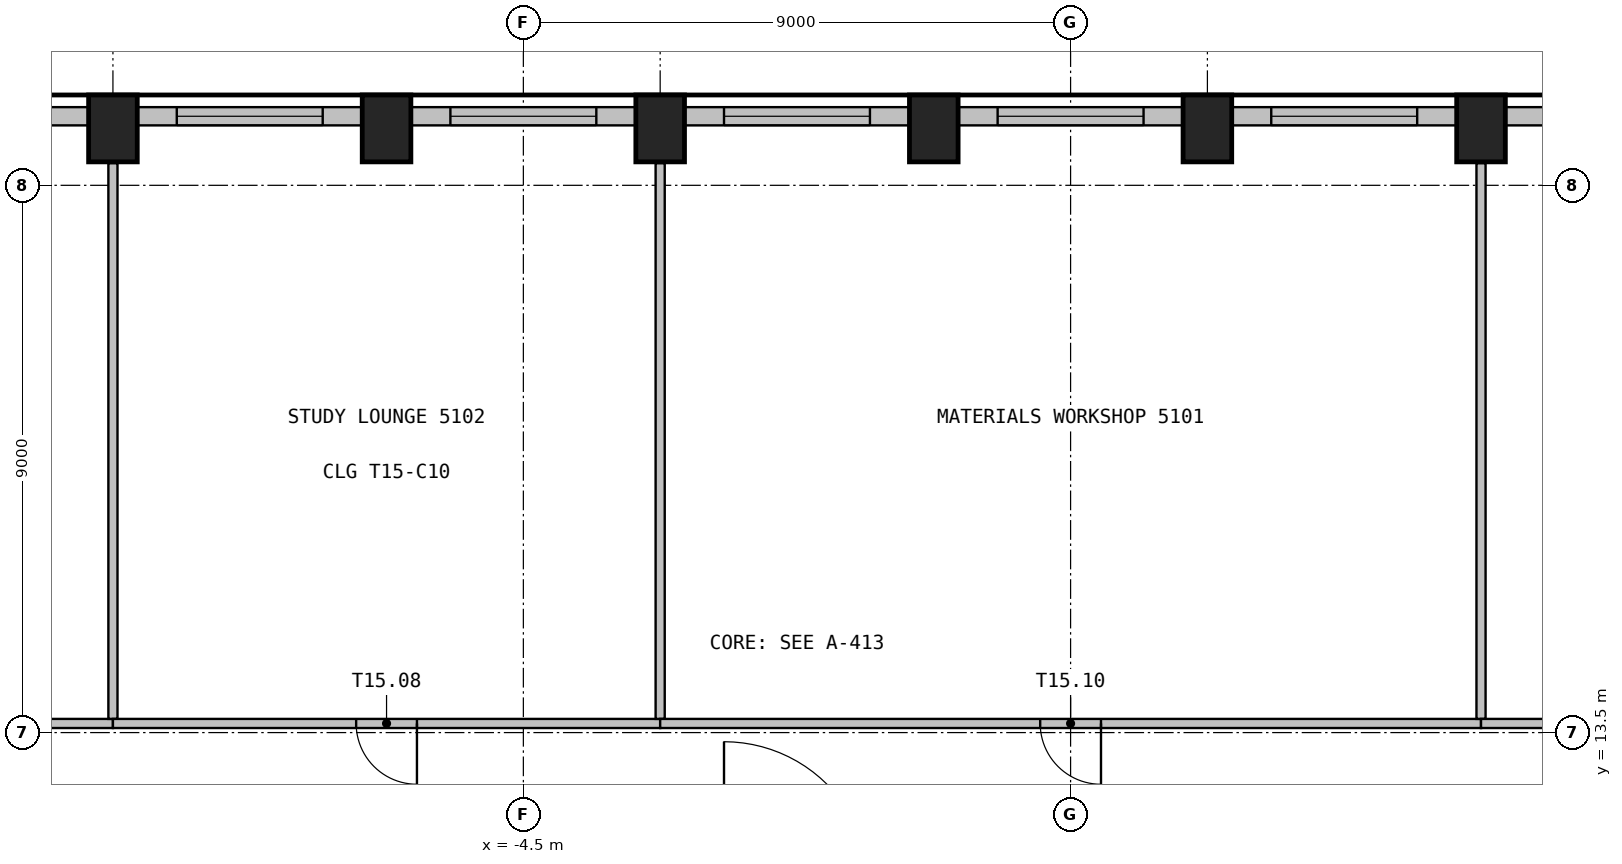
"""IFC4 building model, lengths in metres.
Left out: names, types, materials, properties, quantities, classifications, styles, units other than length and angle.
Written with IfcOpenShell. Run it as: python <this file> out.ifc"""

import sys

from ifc_helpers import new_model, si_unit, direction, frame, frame_2d, origin, origin_2d, place, context, subcontext, project, spatial, rectangle, extrude, element, fill, save


model = new_model("IFC4")
c1 = context("Model", 3, precision=1e-05, world=origin(), true_north=direction((0.0, 1.0)))
c2 = subcontext(c1, "Body", "Model", "MODEL_VIEW")
j1 = project(units=[si_unit("LENGTHUNIT", "METRE"), si_unit("PLANEANGLEUNIT", "RADIAN")], contexts=[c1])
p1 = place(None, origin())
s1 = spatial("IfcSite", under=j1, at=p1, CompositionType="ELEMENT")
p2 = place(p1, origin())
s2 = spatial("IfcBuilding", under=s1, at=p2, CompositionType="ELEMENT")
p3 = place(p2, frame((0.0, 0.0, 207.3)))
s3 = spatial("IfcBuildingStorey", under=s2, at=p3, CompositionType="ELEMENT", Elevation=207.3)
for number, where, z_axis, x_axis in (
    (1, (11.25, 23.436, 0.0), (0.0, 0.0, 1.0), (-1.0, 0.0, 0.0)),
    (2, (6.75, 23.436, 0.0), (0.0, 0.0, 1.0), (-1.0, 0.0, 0.0)),
    (3, (2.25, 23.436, 0.0), (0.0, 0.0, 1.0), (-1.0, 0.0, 0.0)),
    (4, (-2.25, 23.436, 0.0), (0.0, 0.0, 1.0), (-1.0, 0.0, 0.0)),
    (5, (-6.75, 23.436, 0.0), (0.0, 0.0, 1.0), (-1.0, 0.0, 0.0)),
    (6, (-11.25, 23.436, 0.0), (0.0, 0.0, 1.0), (-1.0, 0.0, 0.0)),
):
    element("IfcColumn", number, at=place(p3, frame(where, z_axis=z_axis, x_axis=x_axis)), inside=s3, PredefinedType="COLUMN", context=c2, shape_type="SweptSolid", body=[
        extrude(rectangle(XDim=0.8, YDim=1.1, at=origin_2d()), origin(), (0.0, 0.0, 1.0), 3.55),
    ])
p4 = place(p3, frame((15.046, 23.635, 0.0), z_axis=(0.0, 0.0, 1.0), x_axis=(-1.0, 0.0, 0.0)))
e7 = element("IfcWall", 7, at=p4, inside=s3, PredefinedType="SOLIDWALL", context=c2, shape_type="SweptSolid", body=[
    extrude(rectangle(XDim=3.396, YDim=0.3, at=frame_2d((1.698, 0.0))), origin(), (0.0, 0.0, 1.0), 3.55),
])
p5 = place(p4, frame((0.346, 0.0, 0.9)))
e8 = element("IfcOpeningElement", 8, at=p5, cuts=e7, PredefinedType="OPENING", context=c2, shape_type="SweptSolid", body=[
    extrude(rectangle(XDim=2.4, YDim=2.1, at=frame_2d((1.2, 1.05))), frame((0.0, 0.16, 0.0), z_axis=(0.0, -1.0, 0.0), x_axis=(1.0, 0.0, 0.0)), (0.0, 0.0, 1.0), 0.32),
])
p6 = place(p3, frame((10.85, 23.635, 0.0), z_axis=(0.0, 0.0, 1.0), x_axis=(-1.0, 0.0, 0.0)))
e9 = element("IfcWall", 9, at=p6, inside=s3, PredefinedType="SOLIDWALL", context=c2, shape_type="SweptSolid", body=[
    extrude(rectangle(XDim=3.699, YDim=0.3, at=frame_2d((1.85, 0.0))), origin(), (0.0, 0.0, 1.0), 3.55),
])
p7 = place(p6, frame((0.649, 0.0, 0.9)))
e10 = element("IfcOpeningElement", 10, at=p7, cuts=e9, PredefinedType="OPENING", context=c2, shape_type="SweptSolid", body=[
    extrude(rectangle(XDim=2.4, YDim=2.1, at=frame_2d((1.2, 1.05))), frame((0.0, 0.16, 0.0), z_axis=(0.0, -1.0, 0.0), x_axis=(1.0, 0.0, 0.0)), (0.0, 0.0, 1.0), 0.32),
])
p8 = place(p3, frame((6.35, 23.635, 0.0), z_axis=(0.0, 0.0, 1.0), x_axis=(-1.0, 0.0, 0.0)))
e11 = element("IfcWall", 11, at=p8, inside=s3, PredefinedType="SOLIDWALL", context=c2, shape_type="SweptSolid", body=[
    extrude(rectangle(XDim=3.699, YDim=0.3, at=frame_2d((1.85, 0.0))), origin(), (0.0, 0.0, 1.0), 3.55),
])
p9 = place(p8, frame((0.649, 0.0, 0.9)))
e12 = element("IfcOpeningElement", 12, at=p9, cuts=e11, PredefinedType="OPENING", context=c2, shape_type="SweptSolid", body=[
    extrude(rectangle(XDim=2.4, YDim=2.1, at=frame_2d((1.2, 1.05))), frame((0.0, 0.16, 0.0), z_axis=(0.0, -1.0, 0.0), x_axis=(1.0, 0.0, 0.0)), (0.0, 0.0, 1.0), 0.32),
])
p10 = place(p3, frame((1.85, 23.635, 0.0), z_axis=(0.0, 0.0, 1.0), x_axis=(-1.0, 0.0, 0.0)))
e13 = element("IfcWall", 13, at=p10, inside=s3, PredefinedType="SOLIDWALL", context=c2, shape_type="SweptSolid", body=[
    extrude(rectangle(XDim=3.699, YDim=0.3, at=frame_2d((1.85, 0.0))), origin(), (0.0, 0.0, 1.0), 3.55),
])
p11 = place(p10, frame((0.649, 0.0, 0.9)))
e14 = element("IfcOpeningElement", 14, at=p11, cuts=e13, PredefinedType="OPENING", context=c2, shape_type="SweptSolid", body=[
    extrude(rectangle(XDim=2.4, YDim=2.1, at=frame_2d((1.2, 1.05))), frame((0.0, 0.16, 0.0), z_axis=(0.0, -1.0, 0.0), x_axis=(1.0, 0.0, 0.0)), (0.0, 0.0, 1.0), 0.32),
])
p12 = place(p3, frame((-2.65, 23.635, 0.0), z_axis=(0.0, 0.0, 1.0), x_axis=(-1.0, 0.0, 0.0)))
e15 = element("IfcWall", 15, at=p12, inside=s3, PredefinedType="SOLIDWALL", context=c2, shape_type="SweptSolid", body=[
    extrude(rectangle(XDim=3.699, YDim=0.3, at=frame_2d((1.85, 0.0))), origin(), (0.0, 0.0, 1.0), 3.55),
])
p13 = place(p12, frame((0.649, 0.0, 0.9)))
e16 = element("IfcOpeningElement", 16, at=p13, cuts=e15, PredefinedType="OPENING", context=c2, shape_type="SweptSolid", body=[
    extrude(rectangle(XDim=2.4, YDim=2.1, at=frame_2d((1.2, 1.05))), frame((0.0, 0.16, 0.0), z_axis=(0.0, -1.0, 0.0), x_axis=(1.0, 0.0, 0.0)), (0.0, 0.0, 1.0), 0.32),
])
p14 = place(p3, frame((-7.15, 23.635, 0.0), z_axis=(0.0, 0.0, 1.0), x_axis=(-1.0, 0.0, 0.0)))
e17 = element("IfcWall", 17, at=p14, inside=s3, PredefinedType="SOLIDWALL", context=c2, shape_type="SweptSolid", body=[
    extrude(rectangle(XDim=3.699, YDim=0.3, at=frame_2d((1.85, 0.0))), origin(), (0.0, 0.0, 1.0), 3.55),
])
p15 = place(p14, frame((0.649, 0.0, 0.9)))
e18 = element("IfcOpeningElement", 18, at=p15, cuts=e17, PredefinedType="OPENING", context=c2, shape_type="SweptSolid", body=[
    extrude(rectangle(XDim=2.4, YDim=2.1, at=frame_2d((1.2, 1.05))), frame((0.0, 0.16, 0.0), z_axis=(0.0, -1.0, 0.0), x_axis=(1.0, 0.0, 0.0)), (0.0, 0.0, 1.0), 0.32),
])
p16 = place(p3, frame((-11.65, 23.635, 0.0), z_axis=(0.0, 0.0, 1.0), x_axis=(-1.0, 0.0, 0.0)))
e19 = element("IfcWall", 19, at=p16, inside=s3, PredefinedType="SOLIDWALL", context=c2, shape_type="SweptSolid", body=[
    extrude(rectangle(XDim=3.396, YDim=0.3, at=frame_2d((1.698, 0.0))), origin(), (0.0, 0.0, 1.0), 3.55),
])
p17 = place(p16, frame((0.649, 0.0, 0.9)))
e20 = element("IfcOpeningElement", 20, at=p17, cuts=e19, PredefinedType="OPENING", context=c2, shape_type="SweptSolid", body=[
    extrude(rectangle(XDim=2.4, YDim=2.1, at=frame_2d((1.2, 1.05))), frame((0.0, 0.16, 0.0), z_axis=(0.0, -1.0, 0.0), x_axis=(1.0, 0.0, 0.0)), (0.0, 0.0, 1.0), 0.32),
])
p18 = place(p3, frame((-11.25, 13.65, 0.0), z_axis=(0.0, 0.0, 1.0), x_axis=(-1.0, 0.0, 0.0)))
e21 = element("IfcWall", 21, at=p18, inside=s3, PredefinedType="PARTITIONING", context=c2, shape_type="SweptSolid", body=[
    extrude(rectangle(XDim=4.575, YDim=0.15, at=frame_2d((2.288, 0.0))), origin(), (0.0, 0.0, 1.0), 3.55),
])
p19 = place(p18, frame((1.788, 0.0, 0.0)))
e22 = element("IfcOpeningElement", 22, at=p19, cuts=e21, PredefinedType="OPENING", context=c2, shape_type="SweptSolid", body=[
    extrude(rectangle(XDim=1.0, YDim=2.1, at=frame_2d((0.5, 1.05))), frame((0.0, 0.085, 0.0), z_axis=(0.0, -1.0, 0.0), x_axis=(1.0, 0.0, 0.0)), (0.0, 0.0, 1.0), 0.17),
])
p20 = place(p3, frame((-11.25, 22.865, 0.0), z_axis=(0.0, 0.0, 1.0), x_axis=(0.0, -1.0, 0.0)))
e23 = element("IfcWall", 23, at=p20, inside=s3, PredefinedType="PARTITIONING", context=c2, shape_type="SweptSolid", body=[
    extrude(rectangle(XDim=9.14, YDim=0.15, at=frame_2d((4.57, 0.0))), origin(), (0.0, 0.0, 1.0), 3.55),
])
p21 = place(p3, frame((-2.25, 13.65, 0.0), z_axis=(0.0, 0.0, 1.0), x_axis=(-1.0, 0.0, 0.0)))
e24 = element("IfcWall", 24, at=p21, inside=s3, PredefinedType="PARTITIONING", context=c2, shape_type="SweptSolid", body=[
    extrude(rectangle(XDim=9.0, YDim=0.15, at=frame_2d((4.5, 0.0))), origin(), (0.0, 0.0, 1.0), 3.55),
])
p22 = place(p21, frame((4.0, 0.0, 0.0)))
e25 = element("IfcOpeningElement", 25, at=p22, cuts=e24, PredefinedType="OPENING", context=c2, shape_type="SweptSolid", body=[
    extrude(rectangle(XDim=1.0, YDim=2.1, at=frame_2d((0.5, 1.05))), frame((0.0, 0.085, 0.0), z_axis=(0.0, -1.0, 0.0), x_axis=(1.0, 0.0, 0.0)), (0.0, 0.0, 1.0), 0.17),
])
p23 = place(p3, frame((-2.25, 22.865, 0.0), z_axis=(0.0, 0.0, 1.0), x_axis=(0.0, -1.0, 0.0)))
e26 = element("IfcWall", 26, at=p23, inside=s3, PredefinedType="PARTITIONING", context=c2, shape_type="SweptSolid", body=[
    extrude(rectangle(XDim=9.14, YDim=0.15, at=frame_2d((4.57, 0.0))), origin(), (0.0, 0.0, 1.0), 3.55),
])
p24 = place(p3, frame((11.25, 13.65, 0.0), z_axis=(0.0, 0.0, 1.0), x_axis=(-1.0, 0.0, 0.0)))
e27 = element("IfcWall", 27, at=p24, inside=s3, PredefinedType="PARTITIONING", context=c2, shape_type="SweptSolid", body=[
    extrude(rectangle(XDim=13.5, YDim=0.15, at=frame_2d((6.75, 0.0))), origin(), (0.0, 0.0, 1.0), 3.55),
])
p25 = place(p24, frame((6.25, 0.0, 0.0)))
e28 = element("IfcOpeningElement", 28, at=p25, cuts=e27, PredefinedType="OPENING", context=c2, shape_type="SweptSolid", body=[
    extrude(rectangle(XDim=1.0, YDim=2.1, at=frame_2d((0.5, 1.05))), frame((0.0, 0.085, 0.0), z_axis=(0.0, -1.0, 0.0), x_axis=(1.0, 0.0, 0.0)), (0.0, 0.0, 1.0), 0.17),
])
p26 = place(p3, frame((11.25, 22.865, 0.0), z_axis=(0.0, 0.0, 1.0), x_axis=(0.0, -1.0, 0.0)))
e29 = element("IfcWall", 29, at=p26, inside=s3, PredefinedType="PARTITIONING", context=c2, shape_type="SweptSolid", body=[
    extrude(rectangle(XDim=9.14, YDim=0.15, at=frame_2d((4.57, 0.0))), origin(), (0.0, 0.0, 1.0), 3.55),
])
p27 = place(p3, frame((15.975, 13.65, 0.0), z_axis=(0.0, 0.0, 1.0), x_axis=(-1.0, 0.0, 0.0)))
e30 = element("IfcWall", 30, at=p27, inside=s3, PredefinedType="PARTITIONING", context=c2, shape_type="SweptSolid", body=[
    extrude(rectangle(XDim=4.725, YDim=0.15, at=frame_2d((2.363, 0.0))), origin(), (0.0, 0.0, 1.0), 3.55),
])
p28 = place(p27, frame((1.863, 0.0, 0.0)))
e31 = element("IfcOpeningElement", 31, at=p28, cuts=e30, PredefinedType="OPENING", context=c2, shape_type="SweptSolid", body=[
    extrude(rectangle(XDim=1.0, YDim=2.1, at=frame_2d((0.5, 1.05))), frame((0.0, 0.085, 0.0), z_axis=(0.0, -1.0, 0.0), x_axis=(1.0, 0.0, 0.0)), (0.0, 0.0, 1.0), 0.17),
])
p29 = place(p7, origin())
e32 = element("IfcWindow", 32, at=p29, inside=s3, PartitioningType="SINGLE_PANEL", PredefinedType="WINDOW", context=c2, shape_type="SweptSolid", body=[
    extrude(rectangle(XDim=2.4, YDim=2.1, at=frame_2d((1.2, 1.05))), frame((0.0, 0.03, 0.0), z_axis=(0.0, -1.0, 0.0), x_axis=(1.0, 0.0, 0.0)), (0.0, 0.0, 1.0), 0.06),
])
fill(e10, e32)
p30 = place(p9, origin())
e33 = element("IfcWindow", 33, at=p30, inside=s3, PartitioningType="SINGLE_PANEL", PredefinedType="WINDOW", context=c2, shape_type="SweptSolid", body=[
    extrude(rectangle(XDim=2.4, YDim=2.1, at=frame_2d((1.2, 1.05))), frame((0.0, 0.03, 0.0), z_axis=(0.0, -1.0, 0.0), x_axis=(1.0, 0.0, 0.0)), (0.0, 0.0, 1.0), 0.06),
])
fill(e12, e33)
p31 = place(p11, origin())
e34 = element("IfcWindow", 34, at=p31, inside=s3, PartitioningType="SINGLE_PANEL", PredefinedType="WINDOW", context=c2, shape_type="SweptSolid", body=[
    extrude(rectangle(XDim=2.4, YDim=2.1, at=frame_2d((1.2, 1.05))), frame((0.0, 0.03, 0.0), z_axis=(0.0, -1.0, 0.0), x_axis=(1.0, 0.0, 0.0)), (0.0, 0.0, 1.0), 0.06),
])
fill(e14, e34)
p32 = place(p13, origin())
e35 = element("IfcWindow", 35, at=p32, inside=s3, PartitioningType="SINGLE_PANEL", PredefinedType="WINDOW", context=c2, shape_type="SweptSolid", body=[
    extrude(rectangle(XDim=2.4, YDim=2.1, at=frame_2d((1.2, 1.05))), frame((0.0, 0.03, 0.0), z_axis=(0.0, -1.0, 0.0), x_axis=(1.0, 0.0, 0.0)), (0.0, 0.0, 1.0), 0.06),
])
fill(e16, e35)
p33 = place(p15, origin())
e36 = element("IfcWindow", 36, at=p33, inside=s3, PartitioningType="SINGLE_PANEL", PredefinedType="WINDOW", context=c2, shape_type="SweptSolid", body=[
    extrude(rectangle(XDim=2.4, YDim=2.1, at=frame_2d((1.2, 1.05))), frame((0.0, 0.03, 0.0), z_axis=(0.0, -1.0, 0.0), x_axis=(1.0, 0.0, 0.0)), (0.0, 0.0, 1.0), 0.06),
])
fill(e18, e36)
p34 = place(p22, origin())
e37 = element("IfcDoor", 37, at=p34, inside=s3, OperationType="SINGLE_SWING_RIGHT", PredefinedType="DOOR", context=c2, shape_type="SweptSolid", body=[
    extrude(rectangle(XDim=1.0, YDim=2.1, at=frame_2d((0.5, 1.05))), frame((0.0, 0.025, 0.0), z_axis=(0.0, -1.0, 0.0), x_axis=(1.0, 0.0, 0.0)), (0.0, 0.0, 1.0), 0.05),
])
fill(e25, e37)
p35 = place(p25, origin())
e38 = element("IfcDoor", 38, at=p35, inside=s3, OperationType="SINGLE_SWING_LEFT", PredefinedType="DOOR", context=c2, shape_type="SweptSolid", body=[
    extrude(rectangle(XDim=1.0, YDim=2.1, at=frame_2d((0.5, 1.05))), frame((0.0, 0.025, 0.0), z_axis=(0.0, -1.0, 0.0), x_axis=(1.0, 0.0, 0.0)), (0.0, 0.0, 1.0), 0.05),
])
fill(e28, e38)
save(model, sys.argv[1])
